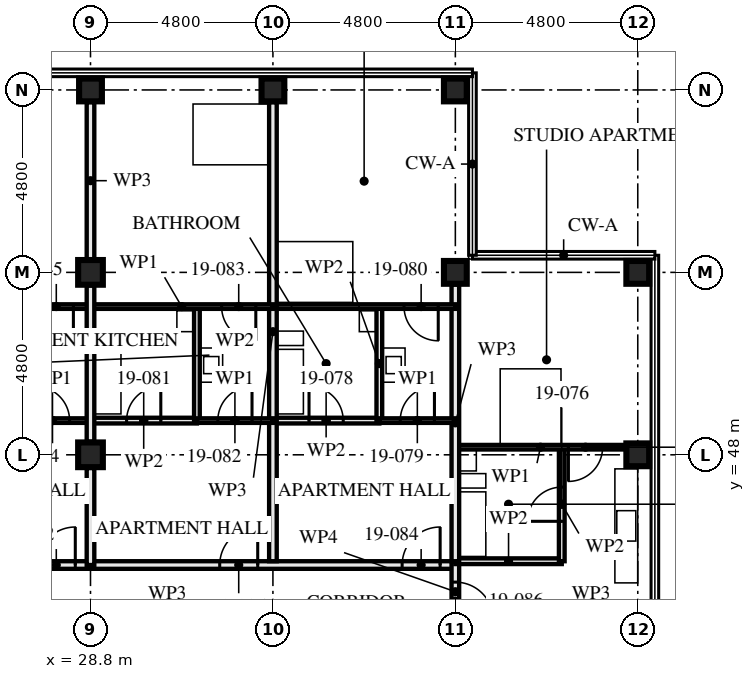
"""IFC4 building model, lengths in metres.
Left out: names, types, materials, properties, quantities, classifications, styles, units other than length and angle.
Written with IfcOpenShell. Run it as: python <this file> out.ifc"""

import sys

from ifc_helpers import new_model, si_unit, direction, frame, frame_2d, origin, origin_2d, place, context, subcontext, project, spatial, rectangle, hollow_rectangle, extrude, element, fill, save


model = new_model("IFC4")
c1 = context("Model", 3, precision=1e-05, world=origin(), true_north=direction((0.0, 1.0)))
c2 = subcontext(c1, "Body", "Model", "MODEL_VIEW")
j1 = project(units=[si_unit("LENGTHUNIT", "METRE"), si_unit("PLANEANGLEUNIT", "RADIAN")], contexts=[c1])
p1 = place(None, origin())
s1 = spatial("IfcSite", under=j1, at=p1, CompositionType="ELEMENT")
p2 = place(p1, origin())
s2 = spatial("IfcBuilding", under=s1, at=p2, CompositionType="ELEMENT")
p3 = place(p2, frame((0.0, 0.0, 72.5)))
s3 = spatial("IfcBuildingStorey", under=s2, at=p3, CompositionType="ELEMENT", Elevation=72.5)
for number, where, z_axis, x_axis in (
    (1, (28.8, 48.0, 0.0), (0.0, 0.0, 1.0), (1.0, 0.0, 0.0)),
    (2, (28.8, 52.8, 0.0), (0.0, 0.0, 1.0), (1.0, 0.0, 0.0)),
):
    element("IfcColumn", number, at=place(p3, frame(where, z_axis=z_axis, x_axis=x_axis)), inside=s3, PredefinedType="COLUMN", context=c2, shape_type="SweptSolid", body=[
        extrude(hollow_rectangle(XDim=0.65, YDim=0.65, WallThickness=0.05, at=origin_2d()), origin(), (0.0, 0.0, 1.0), 3.5),
    ])
for number, where, z_axis, x_axis in (
    (3, (28.8, 57.6, 0.0), (0.0, 0.0, 1.0), (0.0, 1.0, 0.0)),
    (4, (33.6, 57.6, 0.0), (0.0, 0.0, 1.0), (0.0, 1.0, 0.0)),
    (5, (38.4, 52.8, 0.0), (0.0, 0.0, 1.0), (0.0, 1.0, 0.0)),
    (6, (38.4, 57.6, 0.0), (0.0, 0.0, 1.0), (0.0, 1.0, 0.0)),
    (7, (43.2, 48.0, 0.0), (0.0, 0.0, 1.0), (1.0, 0.0, 0.0)),
    (8, (43.2, 52.8, 0.0), (0.0, 0.0, 1.0), (0.0, 1.0, 0.0)),
):
    element("IfcColumn", number, at=place(p3, frame(where, z_axis=z_axis, x_axis=x_axis)), inside=s3, PredefinedType="COLUMN", context=c2, shape_type="SweptSolid", body=[
        extrude(hollow_rectangle(XDim=0.6, YDim=0.6, WallThickness=0.08, at=origin_2d()), origin(), (0.0, 0.0, 1.0), 3.5),
    ])
p4 = place(p3, frame((28.8, 48.9, 0.0), z_axis=(0.0, 0.0, 1.0), x_axis=(-1.0, 0.0, 0.0)))
e9 = element("IfcWall", 9, at=p4, inside=s3, PredefinedType="PARTITIONING", context=c2, shape_type="SweptSolid", body=[
    extrude(rectangle(XDim=2.0, YDim=0.12, at=frame_2d((1.0, 0.0))), origin(), (0.0, 0.0, 1.0), 3.33),
])
p5 = place(p4, frame((0.55, 0.0, 0.0)))
e10 = element("IfcOpeningElement", 10, at=p5, cuts=e9, PredefinedType="OPENING", context=c2, shape_type="SweptSolid", body=[
    extrude(rectangle(XDim=0.9, YDim=2.1, at=frame_2d((0.45, 1.05))), frame((0.0, 0.071, 0.0), z_axis=(0.0, -1.0, 0.0), x_axis=(1.0, 0.0, 0.0)), (0.0, 0.0, 1.0), 0.141),
])
p6 = place(p3, frame((28.8, 51.9, 0.0), z_axis=(0.0, 0.0, 1.0), x_axis=(-1.0, 0.0, 0.0)))
e11 = element("IfcWall", 11, at=p6, inside=s3, PredefinedType="PARTITIONING", context=c2, shape_type="SweptSolid", body=[
    extrude(rectangle(XDim=4.8, YDim=0.12, at=frame_2d((2.4, 0.0))), origin(), (0.0, 0.0, 1.0), 3.33),
])
p7 = place(p6, frame((0.45, 0.0, 0.0)))
e12 = element("IfcOpeningElement", 12, at=p7, cuts=e11, PredefinedType="OPENING", context=c2, shape_type="SweptSolid", body=[
    extrude(rectangle(XDim=0.9, YDim=2.1, at=frame_2d((0.45, 1.05))), frame((0.0, 0.071, 0.0), z_axis=(0.0, -1.0, 0.0), x_axis=(1.0, 0.0, 0.0)), (0.0, 0.0, 1.0), 0.141),
])
p8 = place(p3, frame((28.8, 45.1, 0.0), z_axis=(0.0, 0.0, 1.0), x_axis=(-1.0, 0.0, 0.0)))
e13 = element("IfcWall", 13, at=p8, inside=s3, PredefinedType="PARTITIONING", context=c2, shape_type="SweptSolid", body=[
    extrude(rectangle(XDim=14.4, YDim=0.2, at=frame_2d((7.2, 0.0))), origin(), (0.0, 0.0, 1.0), 3.33),
])
p9 = place(p8, frame((0.4, 0.0, 0.0)))
e14 = element("IfcOpeningElement", 14, at=p9, cuts=e13, PredefinedType="OPENING", context=c2, shape_type="SweptSolid", body=[
    extrude(rectangle(XDim=1.0, YDim=2.1, at=frame_2d((0.5, 1.05))), frame((0.0, 0.111, 0.0), z_axis=(0.0, -1.0, 0.0), x_axis=(1.0, 0.0, 0.0)), (0.0, 0.0, 1.0), 0.221),
])
p10 = place(p8, frame((5.2, 0.0, 0.0)))
e15 = element("IfcOpeningElement", 15, at=p10, cuts=e13, PredefinedType="OPENING", context=c2, shape_type="SweptSolid", body=[
    extrude(rectangle(XDim=1.0, YDim=2.1, at=frame_2d((0.5, 1.05))), frame((0.0, 0.111, 0.0), z_axis=(0.0, -1.0, 0.0), x_axis=(1.0, 0.0, 0.0)), (0.0, 0.0, 1.0), 0.221),
])
p11 = place(p8, frame((10.0, 0.0, 0.0)))
e16 = element("IfcOpeningElement", 16, at=p11, cuts=e13, PredefinedType="OPENING", context=c2, shape_type="SweptSolid", body=[
    extrude(rectangle(XDim=1.0, YDim=2.1, at=frame_2d((0.5, 1.05))), frame((0.0, 0.111, 0.0), z_axis=(0.0, -1.0, 0.0), x_axis=(1.0, 0.0, 0.0)), (0.0, 0.0, 1.0), 0.221),
])
p12 = place(p3, frame((41.2, 48.2, 0.0), z_axis=(0.0, 0.0, 1.0), x_axis=(0.0, -1.0, 0.0)))
e17 = element("IfcWall", 17, at=p12, inside=s3, PredefinedType="PARTITIONING", context=c2, shape_type="SweptSolid", body=[
    extrude(rectangle(XDim=3.0, YDim=0.15, at=frame_2d((1.5, 0.0))), origin(), (0.0, 0.0, 1.0), 2.55),
])
p13 = place(p12, frame((1.05, 0.0, 0.0)))
e18 = element("IfcOpeningElement", 18, at=p13, cuts=e17, PredefinedType="OPENING", context=c2, shape_type="SweptSolid", body=[
    extrude(rectangle(XDim=0.9, YDim=2.1, at=frame_2d((0.45, 1.05))), frame((0.0, 0.085, 0.0), z_axis=(0.0, -1.0, 0.0), x_axis=(1.0, 0.0, 0.0)), (0.0, 0.0, 1.0), 0.171),
])
p14 = place(p3, frame((41.2, 45.2, 0.0), z_axis=(0.0, 0.0, 1.0), x_axis=(-1.0, 0.0, 0.0)))
e19 = element("IfcWall", 19, at=p14, inside=s3, PredefinedType="PARTITIONING", context=c2, shape_type="SweptSolid", body=[
    extrude(rectangle(XDim=2.8, YDim=0.15, at=frame_2d((1.4, 0.0))), origin(), (0.0, 0.0, 1.0), 3.33),
])
p15 = place(p3, frame((42.88, 48.2, 0.0), z_axis=(0.0, 0.0, 1.0), x_axis=(-1.0, 0.0, 0.0)))
e20 = element("IfcWall", 20, at=p15, inside=s3, PredefinedType="PARTITIONING", context=c2, shape_type="SweptSolid", body=[
    extrude(rectangle(XDim=4.48, YDim=0.12, at=frame_2d((2.24, 0.0))), origin(), (0.0, 0.0, 1.0), 3.33),
])
p16 = place(p15, frame((0.605, 0.0, 0.0)))
e21 = element("IfcOpeningElement", 21, at=p16, cuts=e20, PredefinedType="OPENING", context=c2, shape_type="SweptSolid", body=[
    extrude(rectangle(XDim=0.9, YDim=2.1, at=frame_2d((0.45, 1.05))), frame((0.0, 0.071, 0.0), z_axis=(0.0, -1.0, 0.0), x_axis=(1.0, 0.0, 0.0)), (0.0, 0.0, 1.0), 0.141),
])
p17 = place(p3, frame((38.4, 52.48, 0.0), z_axis=(0.0, 0.0, 1.0), x_axis=(0.0, -1.0, 0.0)))
e22 = element("IfcWall", 22, at=p17, inside=s3, PredefinedType="PARTITIONING", context=c2, shape_type="SweptSolid", body=[
    extrude(rectangle(XDim=7.28, YDim=0.2, at=frame_2d((3.64, 0.0))), origin(), (0.0, 0.0, 1.0), 2.55),
])
p18 = place(p3, frame((36.4, 51.9, 0.0), z_axis=(0.0, 0.0, 1.0), x_axis=(0.0, -1.0, 0.0)))
e23 = element("IfcWall", 23, at=p18, inside=s3, PredefinedType="PARTITIONING", context=c2, shape_type="SweptSolid", body=[
    extrude(rectangle(XDim=3.0, YDim=0.15, at=frame_2d((1.5, 0.0))), origin(), (0.0, 0.0, 1.0), 3.33),
])
p19 = place(p3, frame((36.4, 48.9, 0.0), z_axis=(0.0, 0.0, 1.0), x_axis=(-1.0, 0.0, 0.0)))
e24 = element("IfcWall", 24, at=p19, inside=s3, PredefinedType="PARTITIONING", context=c2, shape_type="SweptSolid", body=[
    extrude(rectangle(XDim=2.8, YDim=0.15, at=frame_2d((1.4, 0.0))), origin(), (0.0, 0.0, 1.0), 3.33),
])
p20 = place(p19, frame((0.95, 0.0, 0.0)))
e25 = element("IfcOpeningElement", 25, at=p20, cuts=e24, PredefinedType="OPENING", context=c2, shape_type="SweptSolid", body=[
    extrude(rectangle(XDim=0.9, YDim=2.1, at=frame_2d((0.45, 1.05))), frame((0.0, 0.085, 0.0), z_axis=(0.0, -1.0, 0.0), x_axis=(1.0, 0.0, 0.0)), (0.0, 0.0, 1.0), 0.171),
])
p21 = place(p3, frame((38.4, 48.9, 0.0), z_axis=(0.0, 0.0, 1.0), x_axis=(-1.0, 0.0, 0.0)))
e26 = element("IfcWall", 26, at=p21, inside=s3, PredefinedType="PARTITIONING", context=c2, shape_type="SweptSolid", body=[
    extrude(rectangle(XDim=2.0, YDim=0.12, at=frame_2d((1.0, 0.0))), origin(), (0.0, 0.0, 1.0), 3.33),
])
p22 = place(p21, frame((0.55, 0.0, 0.0)))
e27 = element("IfcOpeningElement", 27, at=p22, cuts=e26, PredefinedType="OPENING", context=c2, shape_type="SweptSolid", body=[
    extrude(rectangle(XDim=0.9, YDim=2.1, at=frame_2d((0.45, 1.05))), frame((0.0, 0.071, 0.0), z_axis=(0.0, -1.0, 0.0), x_axis=(1.0, 0.0, 0.0)), (0.0, 0.0, 1.0), 0.141),
])
p23 = place(p3, frame((38.4, 51.9, 0.0), z_axis=(0.0, 0.0, 1.0), x_axis=(-1.0, 0.0, 0.0)))
e28 = element("IfcWall", 28, at=p23, inside=s3, PredefinedType="PARTITIONING", context=c2, shape_type="SweptSolid", body=[
    extrude(rectangle(XDim=4.8, YDim=0.12, at=frame_2d((2.4, 0.0))), origin(), (0.0, 0.0, 1.0), 3.33),
])
p24 = place(p23, frame((0.45, 0.0, 0.0)))
e29 = element("IfcOpeningElement", 29, at=p24, cuts=e28, PredefinedType="OPENING", context=c2, shape_type="SweptSolid", body=[
    extrude(rectangle(XDim=0.9, YDim=2.1, at=frame_2d((0.45, 1.05))), frame((0.0, 0.071, 0.0), z_axis=(0.0, -1.0, 0.0), x_axis=(1.0, 0.0, 0.0)), (0.0, 0.0, 1.0), 0.141),
])
p25 = place(p3, frame((33.6, 57.28, 0.0), z_axis=(0.0, 0.0, 1.0), x_axis=(0.0, -1.0, 0.0)))
e30 = element("IfcWall", 30, at=p25, inside=s3, PredefinedType="PARTITIONING", context=c2, shape_type="SweptSolid", body=[
    extrude(rectangle(XDim=12.08, YDim=0.2, at=frame_2d((6.04, 0.0))), origin(), (0.0, 0.0, 1.0), 2.55),
])
p26 = place(p3, frame((31.6, 51.9, 0.0), z_axis=(0.0, 0.0, 1.0), x_axis=(0.0, -1.0, 0.0)))
e31 = element("IfcWall", 31, at=p26, inside=s3, PredefinedType="PARTITIONING", context=c2, shape_type="SweptSolid", body=[
    extrude(rectangle(XDim=3.0, YDim=0.15, at=frame_2d((1.5, 0.0))), origin(), (0.0, 0.0, 1.0), 3.33),
])
p27 = place(p3, frame((31.6, 48.9, 0.0), z_axis=(0.0, 0.0, 1.0), x_axis=(-1.0, 0.0, 0.0)))
e32 = element("IfcWall", 32, at=p27, inside=s3, PredefinedType="PARTITIONING", context=c2, shape_type="SweptSolid", body=[
    extrude(rectangle(XDim=2.8, YDim=0.15, at=frame_2d((1.4, 0.0))), origin(), (0.0, 0.0, 1.0), 3.33),
])
p28 = place(p27, frame((0.95, 0.0, 0.0)))
e33 = element("IfcOpeningElement", 33, at=p28, cuts=e32, PredefinedType="OPENING", context=c2, shape_type="SweptSolid", body=[
    extrude(rectangle(XDim=0.9, YDim=2.1, at=frame_2d((0.45, 1.05))), frame((0.0, 0.085, 0.0), z_axis=(0.0, -1.0, 0.0), x_axis=(1.0, 0.0, 0.0)), (0.0, 0.0, 1.0), 0.171),
])
p29 = place(p3, frame((33.6, 48.9, 0.0), z_axis=(0.0, 0.0, 1.0), x_axis=(-1.0, 0.0, 0.0)))
e34 = element("IfcWall", 34, at=p29, inside=s3, PredefinedType="PARTITIONING", context=c2, shape_type="SweptSolid", body=[
    extrude(rectangle(XDim=2.0, YDim=0.12, at=frame_2d((1.0, 0.0))), origin(), (0.0, 0.0, 1.0), 3.33),
])
p30 = place(p29, frame((0.55, 0.0, 0.0)))
e35 = element("IfcOpeningElement", 35, at=p30, cuts=e34, PredefinedType="OPENING", context=c2, shape_type="SweptSolid", body=[
    extrude(rectangle(XDim=0.9, YDim=2.1, at=frame_2d((0.45, 1.05))), frame((0.0, 0.071, 0.0), z_axis=(0.0, -1.0, 0.0), x_axis=(1.0, 0.0, 0.0)), (0.0, 0.0, 1.0), 0.141),
])
p31 = place(p3, frame((33.6, 51.9, 0.0), z_axis=(0.0, 0.0, 1.0), x_axis=(-1.0, 0.0, 0.0)))
e36 = element("IfcWall", 36, at=p31, inside=s3, PredefinedType="PARTITIONING", context=c2, shape_type="SweptSolid", body=[
    extrude(rectangle(XDim=4.8, YDim=0.12, at=frame_2d((2.4, 0.0))), origin(), (0.0, 0.0, 1.0), 3.33),
])
p32 = place(p31, frame((0.45, 0.0, 0.0)))
e37 = element("IfcOpeningElement", 37, at=p32, cuts=e36, PredefinedType="OPENING", context=c2, shape_type="SweptSolid", body=[
    extrude(rectangle(XDim=0.9, YDim=2.1, at=frame_2d((0.45, 1.05))), frame((0.0, 0.071, 0.0), z_axis=(0.0, -1.0, 0.0), x_axis=(1.0, 0.0, 0.0)), (0.0, 0.0, 1.0), 0.141),
])
p33 = place(p3, frame((38.4, 45.1, 0.0), z_axis=(0.0, 0.0, 1.0), x_axis=(-1.0, 0.0, 0.0)))
e38 = element("IfcWall", 38, at=p33, inside=s3, PredefinedType="PARTITIONING", context=c2, shape_type="SweptSolid", body=[
    extrude(rectangle(XDim=9.6, YDim=0.2, at=frame_2d((4.8, 0.0))), origin(), (0.0, 0.0, 1.0), 3.33),
])
p34 = place(p33, frame((0.4, 0.0, 0.0)))
e39 = element("IfcOpeningElement", 39, at=p34, cuts=e38, PredefinedType="OPENING", context=c2, shape_type="SweptSolid", body=[
    extrude(rectangle(XDim=1.0, YDim=2.1, at=frame_2d((0.5, 1.05))), frame((0.0, 0.111, 0.0), z_axis=(0.0, -1.0, 0.0), x_axis=(1.0, 0.0, 0.0)), (0.0, 0.0, 1.0), 0.221),
])
p35 = place(p33, frame((5.2, 0.0, 0.0)))
e40 = element("IfcOpeningElement", 40, at=p35, cuts=e38, PredefinedType="OPENING", context=c2, shape_type="SweptSolid", body=[
    extrude(rectangle(XDim=1.0, YDim=2.1, at=frame_2d((0.5, 1.05))), frame((0.0, 0.111, 0.0), z_axis=(0.0, -1.0, 0.0), x_axis=(1.0, 0.0, 0.0)), (0.0, 0.0, 1.0), 0.221),
])
p36 = place(p3, frame((38.4, 45.2, 0.0), z_axis=(0.0, 0.0, 1.0), x_axis=(0.0, -1.0, 0.0)))
e41 = element("IfcWall", 41, at=p36, inside=s3, PredefinedType="PARTITIONING", context=c2, shape_type="SweptSolid", body=[
    extrude(rectangle(XDim=1.605, YDim=0.2, at=frame_2d((0.802, 0.0))), origin(), (0.0, 0.0, 1.0), 3.33),
])
p37 = place(p36, frame((0.55, 0.0, 0.0)))
e42 = element("IfcOpeningElement", 42, at=p37, cuts=e41, PredefinedType="OPENING", context=c2, shape_type="SweptSolid", body=[
    extrude(rectangle(XDim=1.0, YDim=2.1, at=frame_2d((0.5, 1.05))), frame((0.0, 0.111, 0.0), z_axis=(0.0, -1.0, 0.0), x_axis=(1.0, 0.0, 0.0)), (0.0, 0.0, 1.0), 0.221),
])
p38 = place(p3, frame((28.8, 45.1, 0.0), z_axis=(0.0, 0.0, 1.0), x_axis=(0.0, 1.0, 0.0)))
e43 = element("IfcWall", 43, at=p38, inside=s3, PredefinedType="PARTITIONING", context=c2, shape_type="SweptSolid", body=[
    extrude(rectangle(XDim=2.555, YDim=0.2, at=frame_2d((1.277, 0.0))), origin(), (0.0, 0.0, 1.0), 2.32),
])
p39 = place(p3, frame((28.8, 48.345, 0.0), z_axis=(0.0, 0.0, 1.0), x_axis=(0.0, 1.0, 0.0)))
e44 = element("IfcWall", 44, at=p39, inside=s3, PredefinedType="PARTITIONING", context=c2, shape_type="SweptSolid", body=[
    extrude(rectangle(XDim=4.11, YDim=0.2, at=frame_2d((2.055, 0.0))), origin(), (0.0, 0.0, 1.0), 2.32),
])
p40 = place(p3, frame((28.8, 53.145, 0.0), z_axis=(0.0, 0.0, 1.0), x_axis=(0.0, 1.0, 0.0)))
e45 = element("IfcWall", 45, at=p40, inside=s3, PredefinedType="PARTITIONING", context=c2, shape_type="SweptSolid", body=[
    extrude(rectangle(XDim=4.135, YDim=0.2, at=frame_2d((2.067, 0.0))), origin(), (0.0, 0.0, 1.0), 2.32),
])
p41 = place(p5, frame((0.9, 0.0, 0.0), z_axis=(0.0, 0.0, 1.0), x_axis=(-1.0, 0.0, 0.0)))
e46 = element("IfcDoor", 46, at=p41, inside=s3, OperationType="SINGLE_SWING_RIGHT", PredefinedType="DOOR", context=c2, shape_type="SweptSolid", body=[
    extrude(rectangle(XDim=0.9, YDim=2.1, at=frame_2d((0.45, 1.05))), frame((0.0, 0.022, 0.0), z_axis=(0.0, -1.0, 0.0), x_axis=(1.0, 0.0, 0.0)), (0.0, 0.0, 1.0), 0.044),
])
fill(e10, e46)
p42 = place(p7, origin())
e47 = element("IfcDoor", 47, at=p42, inside=s3, OperationType="SINGLE_SWING_RIGHT", PredefinedType="DOOR", context=c2, shape_type="SweptSolid", body=[
    extrude(rectangle(XDim=0.9, YDim=2.1, at=frame_2d((0.45, 1.05))), frame((0.0, 0.022, 0.0), z_axis=(0.0, -1.0, 0.0), x_axis=(1.0, 0.0, 0.0)), (0.0, 0.0, 1.0), 0.044),
])
fill(e12, e47)
p43 = place(p9, frame((1.0, 0.0, 0.0), z_axis=(0.0, 0.0, 1.0), x_axis=(-1.0, 0.0, 0.0)))
e48 = element("IfcDoor", 48, at=p43, inside=s3, OperationType="SINGLE_SWING_LEFT", PredefinedType="DOOR", context=c2, shape_type="SweptSolid", body=[
    extrude(rectangle(XDim=1.0, YDim=2.1, at=frame_2d((0.5, 1.05))), frame((0.0, 0.027, 0.0), z_axis=(0.0, -1.0, 0.0), x_axis=(1.0, 0.0, 0.0)), (0.0, 0.0, 1.0), 0.054),
])
fill(e14, e48)
p44 = place(p13, frame((0.9, 0.0, 0.0), z_axis=(0.0, 0.0, 1.0), x_axis=(-1.0, 0.0, 0.0)))
e49 = element("IfcDoor", 49, at=p44, inside=s3, OperationType="SINGLE_SWING_RIGHT", PredefinedType="DOOR", context=c2, shape_type="SweptSolid", body=[
    extrude(rectangle(XDim=0.9, YDim=2.1, at=frame_2d((0.45, 1.05))), frame((0.0, 0.022, 0.0), z_axis=(0.0, -1.0, 0.0), x_axis=(1.0, 0.0, 0.0)), (0.0, 0.0, 1.0), 0.044),
])
fill(e18, e49)
p45 = place(p16, origin())
e50 = element("IfcDoor", 50, at=p45, inside=s3, OperationType="SINGLE_SWING_LEFT", PredefinedType="DOOR", context=c2, shape_type="SweptSolid", body=[
    extrude(rectangle(XDim=0.9, YDim=2.1, at=frame_2d((0.45, 1.05))), frame((0.0, 0.022, 0.0), z_axis=(0.0, -1.0, 0.0), x_axis=(1.0, 0.0, 0.0)), (0.0, 0.0, 1.0), 0.044),
])
fill(e21, e50)
p46 = place(p20, frame((0.9, 0.0, 0.0), z_axis=(0.0, 0.0, 1.0), x_axis=(-1.0, 0.0, 0.0)))
e51 = element("IfcDoor", 51, at=p46, inside=s3, OperationType="SINGLE_SWING_RIGHT", PredefinedType="DOOR", context=c2, shape_type="SweptSolid", body=[
    extrude(rectangle(XDim=0.9, YDim=2.1, at=frame_2d((0.45, 1.05))), frame((0.0, 0.022, 0.0), z_axis=(0.0, -1.0, 0.0), x_axis=(1.0, 0.0, 0.0)), (0.0, 0.0, 1.0), 0.044),
])
fill(e25, e51)
p47 = place(p22, frame((0.9, 0.0, 0.0), z_axis=(0.0, 0.0, 1.0), x_axis=(-1.0, 0.0, 0.0)))
e52 = element("IfcDoor", 52, at=p47, inside=s3, OperationType="SINGLE_SWING_LEFT", PredefinedType="DOOR", context=c2, shape_type="SweptSolid", body=[
    extrude(rectangle(XDim=0.9, YDim=2.1, at=frame_2d((0.45, 1.05))), frame((0.0, 0.022, 0.0), z_axis=(0.0, -1.0, 0.0), x_axis=(1.0, 0.0, 0.0)), (0.0, 0.0, 1.0), 0.044),
])
fill(e27, e52)
p48 = place(p24, origin())
e53 = element("IfcDoor", 53, at=p48, inside=s3, OperationType="SINGLE_SWING_RIGHT", PredefinedType="DOOR", context=c2, shape_type="SweptSolid", body=[
    extrude(rectangle(XDim=0.9, YDim=2.1, at=frame_2d((0.45, 1.05))), frame((0.0, 0.022, 0.0), z_axis=(0.0, -1.0, 0.0), x_axis=(1.0, 0.0, 0.0)), (0.0, 0.0, 1.0), 0.044),
])
fill(e29, e53)
p49 = place(p28, frame((0.9, 0.0, 0.0), z_axis=(0.0, 0.0, 1.0), x_axis=(-1.0, 0.0, 0.0)))
e54 = element("IfcDoor", 54, at=p49, inside=s3, OperationType="SINGLE_SWING_LEFT", PredefinedType="DOOR", context=c2, shape_type="SweptSolid", body=[
    extrude(rectangle(XDim=0.9, YDim=2.1, at=frame_2d((0.45, 1.05))), frame((0.0, 0.022, 0.0), z_axis=(0.0, -1.0, 0.0), x_axis=(1.0, 0.0, 0.0)), (0.0, 0.0, 1.0), 0.044),
])
fill(e33, e54)
p50 = place(p30, frame((0.9, 0.0, 0.0), z_axis=(0.0, 0.0, 1.0), x_axis=(-1.0, 0.0, 0.0)))
e55 = element("IfcDoor", 55, at=p50, inside=s3, OperationType="SINGLE_SWING_LEFT", PredefinedType="DOOR", context=c2, shape_type="SweptSolid", body=[
    extrude(rectangle(XDim=0.9, YDim=2.1, at=frame_2d((0.45, 1.05))), frame((0.0, 0.022, 0.0), z_axis=(0.0, -1.0, 0.0), x_axis=(1.0, 0.0, 0.0)), (0.0, 0.0, 1.0), 0.044),
])
fill(e35, e55)
p51 = place(p32, origin())
e56 = element("IfcDoor", 56, at=p51, inside=s3, OperationType="SINGLE_SWING_RIGHT", PredefinedType="DOOR", context=c2, shape_type="SweptSolid", body=[
    extrude(rectangle(XDim=0.9, YDim=2.1, at=frame_2d((0.45, 1.05))), frame((0.0, 0.022, 0.0), z_axis=(0.0, -1.0, 0.0), x_axis=(1.0, 0.0, 0.0)), (0.0, 0.0, 1.0), 0.044),
])
fill(e37, e56)
p52 = place(p34, frame((1.0, 0.0, 0.0), z_axis=(0.0, 0.0, 1.0), x_axis=(-1.0, 0.0, 0.0)))
e57 = element("IfcDoor", 57, at=p52, inside=s3, OperationType="SINGLE_SWING_LEFT", PredefinedType="DOOR", context=c2, shape_type="SweptSolid", body=[
    extrude(rectangle(XDim=1.0, YDim=2.1, at=frame_2d((0.5, 1.05))), frame((0.0, 0.027, 0.0), z_axis=(0.0, -1.0, 0.0), x_axis=(1.0, 0.0, 0.0)), (0.0, 0.0, 1.0), 0.054),
])
fill(e39, e57)
p53 = place(p35, frame((1.0, 0.0, 0.0), z_axis=(0.0, 0.0, 1.0), x_axis=(-1.0, 0.0, 0.0)))
e58 = element("IfcDoor", 58, at=p53, inside=s3, OperationType="SINGLE_SWING_LEFT", PredefinedType="DOOR", context=c2, shape_type="SweptSolid", body=[
    extrude(rectangle(XDim=1.0, YDim=2.1, at=frame_2d((0.5, 1.05))), frame((0.0, 0.027, 0.0), z_axis=(0.0, -1.0, 0.0), x_axis=(1.0, 0.0, 0.0)), (0.0, 0.0, 1.0), 0.054),
])
fill(e40, e58)
p54 = place(p37, origin())
e59 = element("IfcDoor", 59, at=p54, inside=s3, OperationType="SINGLE_SWING_LEFT", PredefinedType="DOOR", context=c2, shape_type="SweptSolid", body=[
    extrude(rectangle(XDim=1.0, YDim=2.1, at=frame_2d((0.5, 1.05))), frame((0.0, 0.027, 0.0), z_axis=(0.0, -1.0, 0.0), x_axis=(1.0, 0.0, 0.0)), (0.0, 0.0, 1.0), 0.054),
])
fill(e42, e59)
save(model, sys.argv[1])
